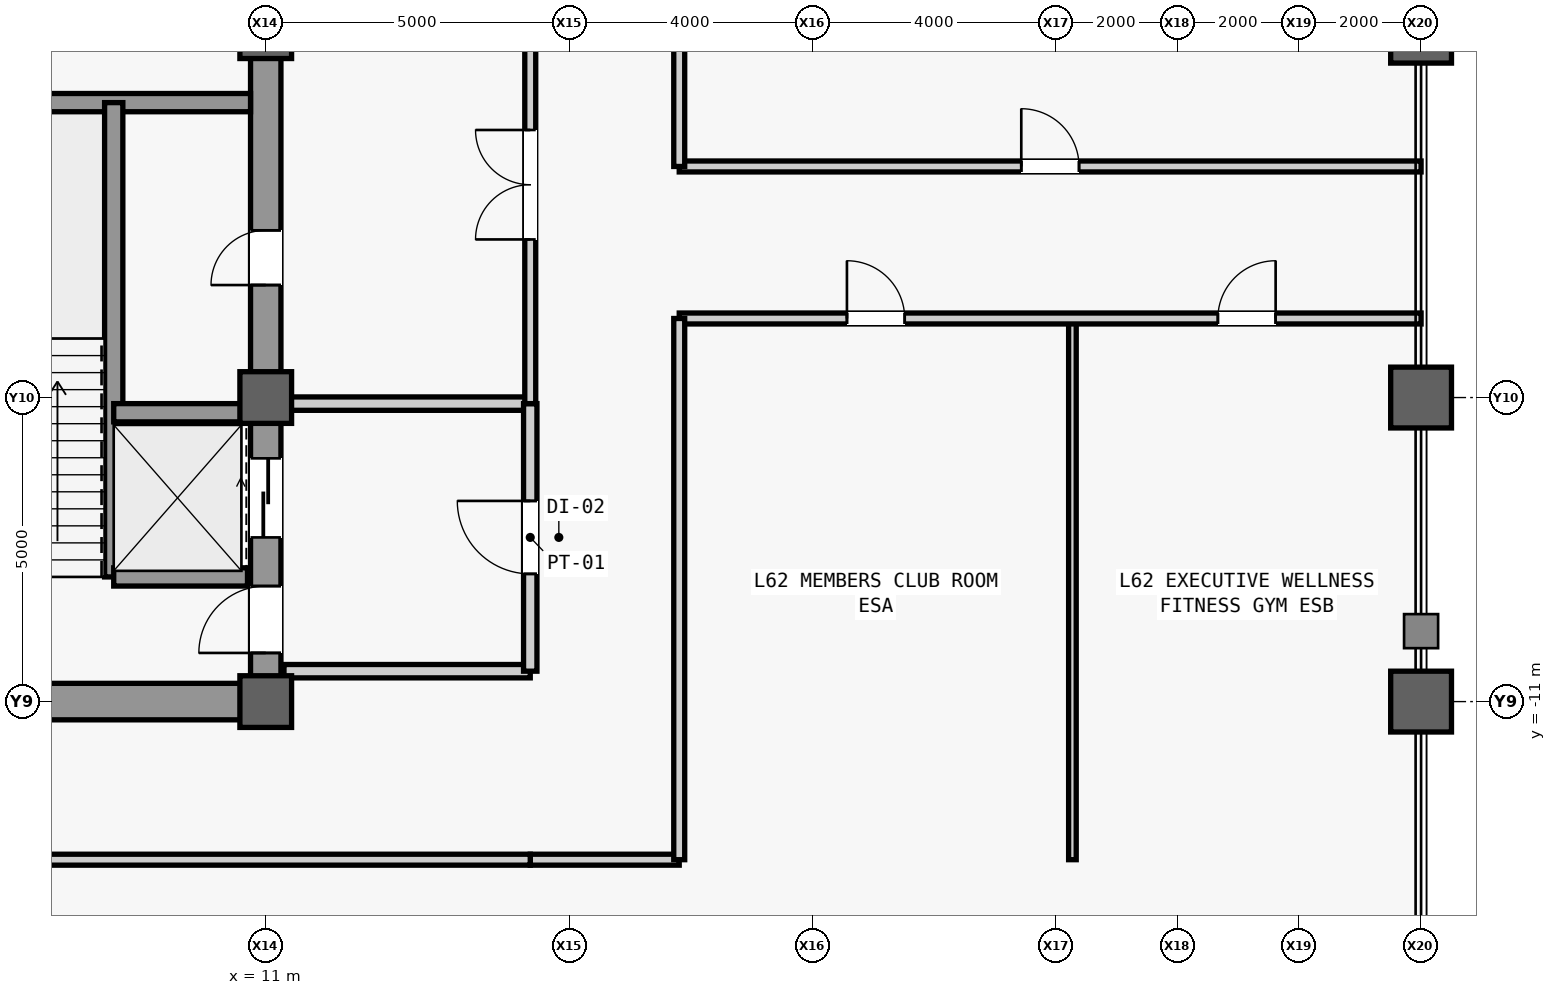
"""IFC4 building model, lengths in metres.
Left out: names, types, materials, properties, quantities, classifications, styles, units other than length and angle.
Written with IfcOpenShell. Run it as: python <this file> out.ifc"""

import sys

from ifc_helpers import new_model, si_unit, direction, frame, frame_2d, origin, origin_2d, place, context, subcontext, project, spatial, rectangle, hollow_rectangle, extrude, source, transform, mapped, element, fill, save


model = new_model("IFC4")
c1 = context("Model", 3, precision=1e-05, world=origin(), true_north=direction((0.0, 1.0)))
c2 = subcontext(c1, "Body", "Model", "MODEL_VIEW")
j1 = project(units=[si_unit("LENGTHUNIT", "METRE"), si_unit("PLANEANGLEUNIT", "RADIAN")], contexts=[c1])
p1 = place(None, origin())
s1 = spatial("IfcSite", under=j1, at=p1, CompositionType="ELEMENT")
p2 = place(p1, origin())
s2 = spatial("IfcBuilding", under=s1, at=p2, CompositionType="ELEMENT")
p3 = place(p2, frame((0.0, 0.0, 263.1)))
s3 = spatial("IfcBuildingStorey", under=s2, at=p3, CompositionType="ELEMENT", Elevation=263.1)
m1 = source(origin(), c2, "Body", "SweptSolid", [
    extrude(rectangle(XDim=22.0, YDim=0.5, at=frame_2d((11.0, 0.0))), origin(), (0.0, 0.0, 1.0), 4.6),
])
p4 = place(p3, frame((11.0, -11.0, 0.0), z_axis=(0.0, 0.0, 1.0), x_axis=(0.0, 1.0, 0.0)))
e1 = element("IfcWall", 1, at=p4, inside=s3, PredefinedType="SHEAR", context=c2, shape_type="MappedRepresentation", body=[
    mapped(m1, transform((0.0, 0.0, 0.0), scale=1.0)),
])
m2 = source(origin(), c2, "Body", "SweptSolid", [
    extrude(rectangle(XDim=1.1, YDim=2.2, at=frame_2d((0.55, 1.1))), frame((0.0, 0.26, 0.0), z_axis=(0.0, -1.0, 0.0), x_axis=(1.0, 0.0, 0.0)), (0.0, 0.0, 1.0), 0.52),
])
p5 = place(p4, frame((0.8, 0.0, 0.0)))
e2 = element("IfcOpeningElement", 2, at=p5, cuts=e1, PredefinedType="OPENING", context=c2, shape_type="MappedRepresentation", body=[
    mapped(m2, transform((0.0, 0.0, 0.0), scale=1.0)),
])
m3 = source(origin(), c2, "Body", "SweptSolid", [
    extrude(rectangle(XDim=0.9, YDim=2.15, at=frame_2d((0.45, 1.075))), frame((0.0, 0.26, 0.0), z_axis=(0.0, -1.0, 0.0), x_axis=(1.0, 0.0, 0.0)), (0.0, 0.0, 1.0), 0.52),
])
p6 = place(p4, frame((6.85, 0.0, 0.0)))
e3 = element("IfcOpeningElement", 3, at=p6, cuts=e1, PredefinedType="OPENING", context=c2, shape_type="MappedRepresentation", body=[
    mapped(m3, transform((0.0, 0.0, 0.0), scale=1.0)),
])
m4 = source(origin(), c2, "Body", "SweptSolid", [
    extrude(rectangle(XDim=1.2, YDim=2.3, at=frame_2d((0.6, 1.15))), frame((0.0, 0.26, 0.0), z_axis=(0.0, -1.0, 0.0), x_axis=(1.0, 0.0, 0.0)), (0.0, 0.0, 1.0), 0.52),
])
p7 = place(p4, frame((17.6, 0.0, 0.0)))
e4 = element("IfcOpeningElement", 4, at=p7, cuts=e1, PredefinedType="OPENING", context=c2, shape_type="MappedRepresentation", body=[
    mapped(m4, transform((0.0, 0.0, 0.0), scale=1.0)),
])
p8 = place(p4, frame((19.6, 0.0, 0.0)))
e5 = element("IfcOpeningElement", 5, at=p8, cuts=e1, PredefinedType="OPENING", context=c2, shape_type="MappedRepresentation", body=[
    mapped(m4, transform((0.0, 0.0, 0.0), scale=1.0)),
])
m5 = source(origin(), c2, "Body", "SweptSolid", [
    extrude(rectangle(XDim=1.3, YDim=2.3, at=frame_2d((0.65, 1.15))), frame((0.0, 0.26, 0.0), z_axis=(0.0, -1.0, 0.0), x_axis=(1.0, 0.0, 0.0)), (0.0, 0.0, 1.0), 0.52),
])
p9 = place(p4, frame((2.7, 0.0, 0.0)))
e6 = element("IfcOpeningElement", 6, at=p9, cuts=e1, PredefinedType="OPENING", context=c2, shape_type="MappedRepresentation", body=[
    mapped(m5, transform((0.0, 0.0, 0.0), scale=1.0)),
])
p10 = place(p4, frame((13.35, 0.0, 0.0)))
e7 = element("IfcOpeningElement", 7, at=p10, cuts=e1, PredefinedType="OPENING", context=c2, shape_type="MappedRepresentation", body=[
    mapped(m5, transform((0.0, 0.0, 0.0), scale=1.0)),
])
m6 = source(origin(), c2, "Body", "SweptSolid", [
    extrude(rectangle(XDim=5.9, YDim=0.6, at=frame_2d((2.95, 0.0))), origin(), (0.0, 0.0, 1.0), 4.6),
])
p11 = place(p3, frame((4.85, -11.0, 0.0), z_axis=(0.0, 0.0, 1.0), x_axis=(1.0, 0.0, 0.0)))
e8 = element("IfcWall", 8, at=p11, inside=s3, PredefinedType="SHEAR", context=c2, shape_type="MappedRepresentation", body=[
    mapped(m6, transform((0.0, 0.0, 0.0), scale=1.0)),
])
m7 = source(origin(), c2, "Body", "SweptSolid", [
    extrude(rectangle(XDim=5.65, YDim=0.3, at=frame_2d((2.825, 0.0))), origin(), (0.0, 0.0, 1.0), 4.6),
])
p12 = place(p3, frame((5.1, -1.15, 0.0), z_axis=(0.0, 0.0, 1.0), x_axis=(1.0, 0.0, 0.0)))
e9 = element("IfcWall", 9, at=p12, inside=s3, PredefinedType="SHEAR", context=c2, shape_type="MappedRepresentation", body=[
    mapped(m7, transform((0.0, 0.0, 0.0), scale=1.0)),
])
m8 = source(origin(), c2, "Body", "SweptSolid", [
    extrude(rectangle(XDim=0.85, YDim=0.85, at=origin_2d()), origin(), (0.0, 0.0, 1.0), 5.2),
])
for number, where, z_axis, x_axis in (
    (10, (11.0, -11.0, 0.0), (0.0, 0.0, 1.0), (1.0, 0.0, 0.0)),
    (11, (11.0, -6.0, 0.0), (0.0, 0.0, 1.0), (1.0, 0.0, 0.0)),
    (12, (11.0, 0.0, 0.0), (0.0, 0.0, 1.0), (1.0, 0.0, 0.0)),
):
    element("IfcColumn", number, at=place(p3, frame(where, z_axis=z_axis, x_axis=x_axis)), inside=s3, PredefinedType="COLUMN", context=c2, shape_type="MappedRepresentation", body=[
        mapped(m8, transform((0.0, 0.0, 0.0), scale=1.0)),
    ])
m9 = source(origin(), c2, "Body", "SweptSolid", [
    extrude(hollow_rectangle(XDim=1.0, YDim=1.0, WallThickness=0.055, at=origin_2d()), origin(), (0.0, 0.0, 1.0), 5.2),
])
for number, where, z_axis, x_axis in (
    (13, (30.0, -11.0, 0.0), (0.0, 0.0, 1.0), (1.0, 0.0, 0.0)),
    (14, (30.0, -6.0, 0.0), (0.0, 0.0, 1.0), (1.0, 0.0, 0.0)),
    (15, (30.0, 0.0, 0.0), (0.0, 0.0, 1.0), (1.0, 0.0, 0.0)),
):
    element("IfcColumn", number, at=place(p3, frame(where, z_axis=z_axis, x_axis=x_axis)), inside=s3, PredefinedType="COLUMN", context=c2, shape_type="MappedRepresentation", body=[
        mapped(m9, transform((0.0, 0.0, 0.0), scale=1.0)),
    ])
m10 = source(origin(), c2, "Body", "SweptSolid", [
    extrude(rectangle(XDim=7.8, YDim=0.3, at=frame_2d((3.9, 0.0))), origin(), (0.0, 0.0, 1.0), 4.6),
])
p13 = place(p3, frame((8.5, -8.95, 0.0), z_axis=(0.0, 0.0, 1.0), x_axis=(0.0, 1.0, 0.0)))
e16 = element("IfcWall", 16, at=p13, inside=s3, PredefinedType="SHEAR", context=c2, shape_type="MappedRepresentation", body=[
    mapped(m10, transform((0.0, 0.0, 0.0), scale=1.0)),
])
m11 = source(origin(), c2, "Body", "SweptSolid", [
    extrude(rectangle(XDim=2.2, YDim=0.3, at=frame_2d((1.1, 0.0))), origin(), (0.0, 0.0, 1.0), 4.6),
])
for number, where, z_axis, x_axis in (
    (17, (8.5, -8.95, 0.0), (0.0, 0.0, 1.0), (1.0, 0.0, 0.0)),
    (18, (8.5, -6.25, 0.0), (0.0, 0.0, 1.0), (1.0, 0.0, 0.0)),
):
    element("IfcWall", number, at=place(p3, frame(where, z_axis=z_axis, x_axis=x_axis)), inside=s3, PredefinedType="SHEAR", context=c2, shape_type="MappedRepresentation", body=[
        mapped(m11, transform((0.0, 0.0, 0.0), scale=1.0)),
    ])
m12 = source(origin(), c2, "Body", "SweptSolid", [
    extrude(rectangle(XDim=4.05, YDim=0.22, at=frame_2d((2.025, 0.0))), origin(), (0.0, 0.0, 1.0), 4.6),
])
p14 = place(p3, frame((11.3, -10.5, 0.0), z_axis=(0.0, 0.0, 1.0), x_axis=(1.0, 0.0, 0.0)))
e19 = element("IfcWall", 19, at=p14, inside=s3, PredefinedType="PARTITIONING", context=c2, shape_type="MappedRepresentation", body=[
    mapped(m12, transform((0.0, 0.0, 0.0), scale=1.0)),
])
m13 = source(origin(), c2, "Body", "SweptSolid", [
    extrude(rectangle(XDim=4.05, YDim=0.22, at=frame_2d((2.025, 0.0))), origin(), (0.0, 0.0, 1.0), 2.8),
])
p15 = place(p3, frame((11.3, -6.1, 0.0), z_axis=(0.0, 0.0, 1.0), x_axis=(1.0, 0.0, 0.0)))
e20 = element("IfcWall", 20, at=p15, inside=s3, PredefinedType="PARTITIONING", context=c2, shape_type="MappedRepresentation", body=[
    mapped(m13, transform((0.0, 0.0, 0.0), scale=1.0)),
])
m14 = source(origin(), c2, "Body", "SweptSolid", [
    extrude(rectangle(XDim=4.4, YDim=0.22, at=frame_2d((2.2, 0.0))), origin(), (0.0, 0.0, 1.0), 4.6),
])
p16 = place(p3, frame((15.35, -10.5, 0.0), z_axis=(0.0, 0.0, 1.0), x_axis=(0.0, 1.0, 0.0)))
e21 = element("IfcWall", 21, at=p16, inside=s3, PredefinedType="PARTITIONING", context=c2, shape_type="MappedRepresentation", body=[
    mapped(m14, transform((0.0, 0.0, 0.0), scale=1.0)),
])
m15 = source(origin(), c2, "Body", "SweptSolid", [
    extrude(rectangle(XDim=1.2, YDim=2.2, at=frame_2d((0.6, 1.1))), frame((0.0, 0.12, 0.0), z_axis=(0.0, -1.0, 0.0), x_axis=(1.0, 0.0, 0.0)), (0.0, 0.0, 1.0), 0.24),
])
p17 = place(p16, frame((1.6, 0.0, 0.0)))
e22 = element("IfcOpeningElement", 22, at=p17, cuts=e21, PredefinedType="OPENING", context=c2, shape_type="MappedRepresentation", body=[
    mapped(m15, transform((0.0, 0.0, 0.0), scale=1.0)),
])
m16 = source(origin(), c2, "Body", "SweptSolid", [
    extrude(rectangle(XDim=16.6, YDim=0.18, at=frame_2d((8.3, 0.0))), origin(), (0.0, 0.0, 1.0), 4.6),
])
p18 = place(p3, frame((15.35, -6.1, 0.0), z_axis=(0.0, 0.0, 1.0), x_axis=(0.0, 1.0, 0.0)))
e23 = element("IfcWall", 23, at=p18, inside=s3, PredefinedType="PARTITIONING", context=c2, shape_type="MappedRepresentation", body=[
    mapped(m16, transform((0.0, 0.0, 0.0), scale=1.0)),
])
m17 = source(origin(), c2, "Body", "SweptSolid", [
    extrude(rectangle(XDim=1.8, YDim=2.25, at=frame_2d((0.9, 1.125))), frame((0.0, 0.1, 0.0), z_axis=(0.0, -1.0, 0.0), x_axis=(1.0, 0.0, 0.0)), (0.0, 0.0, 1.0), 0.2),
])
p19 = place(p18, frame((2.7, 0.0, 0.0)))
e24 = element("IfcOpeningElement", 24, at=p19, cuts=e23, PredefinedType="OPENING", context=c2, shape_type="MappedRepresentation", body=[
    mapped(m17, transform((0.0, 0.0, 0.0), scale=1.0)),
])
p20 = place(p18, frame((13.0, 0.0, 0.0)))
e25 = element("IfcOpeningElement", 25, at=p20, cuts=e23, PredefinedType="OPENING", context=c2, shape_type="MappedRepresentation", body=[
    mapped(m17, transform((0.0, 0.0, 0.0), scale=1.0)),
])
m18 = source(origin(), c2, "Body", "SweptSolid", [
    extrude(rectangle(XDim=2.45, YDim=0.18, at=frame_2d((1.225, 0.0))), origin(), (0.0, 0.0, 1.0), 4.6),
])
p21 = place(p3, frame((15.35, -13.6, 0.0), z_axis=(0.0, 0.0, 1.0), x_axis=(1.0, 0.0, 0.0)))
e26 = element("IfcWall", 26, at=p21, inside=s3, PredefinedType="PARTITIONING", context=c2, shape_type="MappedRepresentation", body=[
    mapped(m18, transform((0.0, 0.0, 0.0), scale=1.0)),
])
m19 = source(origin(), c2, "Body", "SweptSolid", [
    extrude(rectangle(XDim=25.45, YDim=0.18, at=frame_2d((12.725, 0.0))), origin(), (0.0, 0.0, 1.0), 4.6),
])
p22 = place(p3, frame((-10.1, -13.6, 0.0), z_axis=(0.0, 0.0, 1.0), x_axis=(1.0, 0.0, 0.0)))
e27 = element("IfcWall", 27, at=p22, inside=s3, PredefinedType="PARTITIONING", context=c2, shape_type="MappedRepresentation", body=[
    mapped(m19, transform((0.0, 0.0, 0.0), scale=1.0)),
])
m20 = source(origin(), c2, "Body", "SweptSolid", [
    extrude(rectangle(XDim=8.9, YDim=0.125, at=frame_2d((4.45, 0.0))), origin(), (0.0, 0.0, 1.0), 4.6),
])
p23 = place(p3, frame((24.266, -13.6, 0.0), z_axis=(0.0, 0.0, 1.0), x_axis=(0.0, 1.0, 0.0)))
e28 = element("IfcWall", 28, at=p23, inside=s3, PredefinedType="PARTITIONING", context=c2, shape_type="MappedRepresentation", body=[
    mapped(m20, transform((0.0, 0.0, 0.0), scale=1.0)),
])
m21 = source(origin(), c2, "Body", "SweptSolid", [
    extrude(rectangle(XDim=12.2, YDim=0.18, at=frame_2d((6.1, 0.0))), origin(), (0.0, 0.0, 1.0), 4.6),
])
p24 = place(p3, frame((17.8, -4.7, 0.0), z_axis=(0.0, 0.0, 1.0), x_axis=(1.0, 0.0, 0.0)))
e29 = element("IfcWall", 29, at=p24, inside=s3, PredefinedType="PARTITIONING", context=c2, shape_type="MappedRepresentation", body=[
    mapped(m21, transform((0.0, 0.0, 0.0), scale=1.0)),
])
m22 = source(origin(), c2, "Body", "SweptSolid", [
    extrude(rectangle(XDim=0.95, YDim=2.15, at=frame_2d((0.475, 1.075))), frame((0.0, 0.1, 0.0), z_axis=(0.0, -1.0, 0.0), x_axis=(1.0, 0.0, 0.0)), (0.0, 0.0, 1.0), 0.2),
])
p25 = place(p24, frame((2.758, 0.0, 0.0)))
e30 = element("IfcOpeningElement", 30, at=p25, cuts=e29, PredefinedType="OPENING", context=c2, shape_type="MappedRepresentation", body=[
    mapped(m22, transform((0.0, 0.0, 0.0), scale=1.0)),
])
p26 = place(p24, frame((8.858, 0.0, 0.0)))
e31 = element("IfcOpeningElement", 31, at=p26, cuts=e29, PredefinedType="OPENING", context=c2, shape_type="MappedRepresentation", body=[
    mapped(m22, transform((0.0, 0.0, 0.0), scale=1.0)),
])
m23 = source(origin(), c2, "Body", "SweptSolid", [
    extrude(rectangle(XDim=8.9, YDim=0.18, at=frame_2d((4.45, 0.0))), origin(), (0.0, 0.0, 1.0), 4.6),
])
p27 = place(p3, frame((17.8, -13.6, 0.0), z_axis=(0.0, 0.0, 1.0), x_axis=(0.0, 1.0, 0.0)))
e32 = element("IfcWall", 32, at=p27, inside=s3, PredefinedType="PARTITIONING", context=c2, shape_type="MappedRepresentation", body=[
    mapped(m23, transform((0.0, 0.0, 0.0), scale=1.0)),
])
p28 = place(p3, frame((17.8, -2.2, 0.0), z_axis=(0.0, 0.0, 1.0), x_axis=(1.0, 0.0, 0.0)))
e33 = element("IfcWall", 33, at=p28, inside=s3, PredefinedType="PARTITIONING", context=c2, shape_type="MappedRepresentation", body=[
    mapped(m21, transform((0.0, 0.0, 0.0), scale=1.0)),
])
p29 = place(p28, frame((5.625, 0.0, 0.0)))
e34 = element("IfcOpeningElement", 34, at=p29, cuts=e33, PredefinedType="OPENING", context=c2, shape_type="MappedRepresentation", body=[
    mapped(m22, transform((0.0, 0.0, 0.0), scale=1.0)),
])
m24 = source(origin(), c2, "Body", "SweptSolid", [
    extrude(rectangle(XDim=16.3, YDim=0.18, at=frame_2d((8.15, 0.0))), origin(), (0.0, 0.0, 1.0), 4.6),
])
p30 = place(p3, frame((17.8, -2.2, 0.0), z_axis=(0.0, 0.0, 1.0), x_axis=(0.0, 1.0, 0.0)))
e35 = element("IfcWall", 35, at=p30, inside=s3, PredefinedType="PARTITIONING", context=c2, shape_type="MappedRepresentation", body=[
    mapped(m24, transform((0.0, 0.0, 0.0), scale=1.0)),
])
m25 = source(origin(), c2, "Body", "SweptSolid", [
    extrude(rectangle(XDim=1.1, YDim=2.2, at=frame_2d((0.55, 1.1))), frame((0.0, 0.025, 0.0), z_axis=(0.0, -1.0, 0.0), x_axis=(1.0, 0.0, 0.0)), (0.0, 0.0, 1.0), 0.05),
])
p31 = place(p5, origin())
e36 = element("IfcDoor", 36, at=p31, inside=s3, OperationType="SINGLE_SWING_LEFT", PredefinedType="DOOR", context=c2, shape_type="MappedRepresentation", body=[
    mapped(m25, transform((0.0, 0.0, 0.0), scale=1.0)),
])
fill(e2, e36)
m26 = source(origin(), c2, "Body", "SweptSolid", [
    extrude(rectangle(XDim=0.9, YDim=2.15, at=frame_2d((0.45, 1.075))), frame((0.0, 0.025, 0.0), z_axis=(0.0, -1.0, 0.0), x_axis=(1.0, 0.0, 0.0)), (0.0, 0.0, 1.0), 0.05),
])
p32 = place(p6, origin())
e37 = element("IfcDoor", 37, at=p32, inside=s3, OperationType="SINGLE_SWING_LEFT", PredefinedType="DOOR", context=c2, shape_type="MappedRepresentation", body=[
    mapped(m26, transform((0.0, 0.0, 0.0), scale=1.0)),
])
fill(e3, e37)
m27 = source(origin(), c2, "Body", "SweptSolid", [
    extrude(rectangle(XDim=1.2, YDim=2.2, at=frame_2d((0.6, 1.1))), frame((0.0, 0.025, 0.0), z_axis=(0.0, -1.0, 0.0), x_axis=(1.0, 0.0, 0.0)), (0.0, 0.0, 1.0), 0.05),
])
p33 = place(p17, origin())
e38 = element("IfcDoor", 38, at=p33, inside=s3, OperationType="SINGLE_SWING_RIGHT", PredefinedType="DOOR", context=c2, shape_type="MappedRepresentation", body=[
    mapped(m27, transform((0.0, 0.0, 0.0), scale=1.0)),
])
fill(e22, e38)
m28 = source(origin(), c2, "Body", "SweptSolid", [
    extrude(rectangle(XDim=1.8, YDim=2.25, at=frame_2d((0.9, 1.125))), frame((0.0, 0.025, 0.0), z_axis=(0.0, -1.0, 0.0), x_axis=(1.0, 0.0, 0.0)), (0.0, 0.0, 1.0), 0.05),
])
p34 = place(p19, origin())
e39 = element("IfcDoor", 39, at=p34, inside=s3, OperationType="SINGLE_SWING_RIGHT", PredefinedType="DOOR", context=c2, shape_type="MappedRepresentation", body=[
    mapped(m28, transform((0.0, 0.0, 0.0), scale=1.0)),
])
fill(e24, e39)
m29 = source(origin(), c2, "Body", "SweptSolid", [
    extrude(rectangle(XDim=0.95, YDim=2.15, at=frame_2d((0.475, 1.075))), frame((0.0, 0.025, 0.0), z_axis=(0.0, -1.0, 0.0), x_axis=(1.0, 0.0, 0.0)), (0.0, 0.0, 1.0), 0.05),
])
p35 = place(p25, origin())
e40 = element("IfcDoor", 40, at=p35, inside=s3, OperationType="SINGLE_SWING_LEFT", PredefinedType="DOOR", context=c2, shape_type="MappedRepresentation", body=[
    mapped(m29, transform((0.0, 0.0, 0.0), scale=1.0)),
])
fill(e30, e40)
p36 = place(p26, origin())
e41 = element("IfcDoor", 41, at=p36, inside=s3, OperationType="SINGLE_SWING_RIGHT", PredefinedType="DOOR", context=c2, shape_type="MappedRepresentation", body=[
    mapped(m29, transform((0.0, 0.0, 0.0), scale=1.0)),
])
fill(e31, e41)
p37 = place(p29, origin())
e42 = element("IfcDoor", 42, at=p37, inside=s3, OperationType="SINGLE_SWING_LEFT", PredefinedType="DOOR", context=c2, shape_type="MappedRepresentation", body=[
    mapped(m29, transform((0.0, 0.0, 0.0), scale=1.0)),
])
fill(e34, e42)
m30 = source(origin(), c2, "Body", "SweptSolid", [
    extrude(rectangle(XDim=1.3, YDim=2.3, at=frame_2d((0.65, 1.15))), frame((0.0, 0.025, 0.0), z_axis=(0.0, -1.0, 0.0), x_axis=(1.0, 0.0, 0.0)), (0.0, 0.0, 1.0), 0.05),
])
p38 = place(p9, origin())
e43 = element("IfcDoor", 43, at=p38, inside=s3, OperationType="SLIDING_TO_LEFT", PredefinedType="DOOR", context=c2, shape_type="MappedRepresentation", body=[
    mapped(m30, transform((0.0, 0.0, 0.0), scale=1.0)),
])
fill(e6, e43)
save(model, sys.argv[1])
